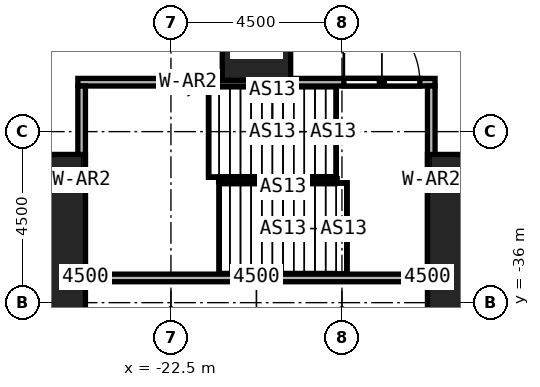
"""IFC4 building model, lengths in metres.
Left out: names, types, materials, properties, quantities, classifications, styles, units other than length and angle.
Written with IfcOpenShell. Run it as: python <this file> out.ifc"""

import sys

from ifc_helpers import new_model, si_unit, direction, frame, frame_2d, origin, origin_2d, place, context, subcontext, project, spatial, rectangle, extrude, element, fill, save


model = new_model("IFC4")
c1 = context("Model", 3, precision=1e-05, world=origin(), true_north=direction((0.0, 1.0)))
c2 = subcontext(c1, "Body", "Model", "MODEL_VIEW")
j1 = project(units=[si_unit("LENGTHUNIT", "METRE"), si_unit("PLANEANGLEUNIT", "RADIAN")], contexts=[c1])
p1 = place(None, origin())
s1 = spatial("IfcSite", under=j1, at=p1, CompositionType="ELEMENT")
p2 = place(p1, origin())
s2 = spatial("IfcBuilding", under=s1, at=p2, CompositionType="ELEMENT")
p3 = place(p2, origin())
s3 = spatial("IfcBuildingStorey", under=s2, at=p3, CompositionType="ELEMENT", Elevation=0.0)
for number, where, z_axis, x_axis in (
    (1, (-27.0, -35.55, 0.0), (0.0, 0.0, 1.0), (1.0, 0.0, 0.0)),
    (2, (-13.5, -35.55, 0.0), (0.0, 0.0, 1.0), (1.0, 0.0, 0.0)),
):
    element("IfcColumn", number, at=place(p3, frame(where, z_axis=z_axis, x_axis=x_axis)), inside=s3, PredefinedType="COLUMN", context=c2, shape_type="SweptSolid", body=[
        extrude(rectangle(XDim=4.5, YDim=6.9, at=origin_2d()), origin(), (0.0, 0.0, 1.0), 12.0),
    ])
p4 = place(p3, frame((-20.25, -29.25, 0.0), z_axis=(0.0, 0.0, 1.0), x_axis=(1.0, 0.0, 0.0)))
e3 = element("IfcColumn", 3, at=p4, inside=s3, PredefinedType="COLUMN", context=c2, shape_type="SweptSolid", body=[
    extrude(rectangle(XDim=1.8, YDim=1.8, at=origin_2d()), origin(), (0.0, 0.0, 1.0), 12.0),
])
p5 = place(p3, frame((-24.95, -30.2, 0.0), z_axis=(0.0, 0.0, 1.0), x_axis=(1.0, 0.0, 0.0)))
e4 = element("IfcWall", 4, at=p5, inside=s3, PredefinedType="SOLIDWALL", context=c2, shape_type="SweptSolid", body=[
    extrude(rectangle(XDim=9.4, YDim=0.2, at=frame_2d((4.7, 0.0))), origin(), (0.0, 0.0, 1.0), 12.0),
])
p6 = place(p5, frame((7.0, 0.0, 0.0)))
e5 = element("IfcOpeningElement", 5, at=p6, cuts=e4, PredefinedType="OPENING", context=c2, shape_type="SweptSolid", body=[
    extrude(rectangle(XDim=2.0, YDim=2.4, at=frame_2d((1.0, 1.2))), frame((0.0, 0.1, 0.0), z_axis=(0.0, -1.0, 0.0), x_axis=(1.0, 0.0, 0.0)), (0.0, 0.0, 1.0), 0.2),
])
p7 = place(p3, frame((-24.95, -35.35, 0.0), z_axis=(0.0, 0.0, 1.0), x_axis=(1.0, 0.0, 0.0)))
e6 = element("IfcWall", 6, at=p7, inside=s3, PredefinedType="SOLIDWALL", context=c2, shape_type="SweptSolid", body=[
    extrude(rectangle(XDim=9.4, YDim=0.2, at=frame_2d((4.7, 0.0))), origin(), (0.0, 0.0, 1.0), 12.0),
])
for number, where, z_axis, x_axis in (
    (7, (-24.85, -35.25, 0.0), (0.0, 0.0, 1.0), (0.0, 1.0, 0.0)),
    (8, (-15.65, -35.25, 0.0), (0.0, 0.0, 1.0), (0.0, 1.0, 0.0)),
):
    element("IfcWall", number, at=place(p3, frame(where, z_axis=z_axis, x_axis=x_axis)), inside=s3, PredefinedType="SOLIDWALL", context=c2, shape_type="SweptSolid", body=[
        extrude(rectangle(XDim=4.95, YDim=0.2, at=frame_2d((2.475, 0.0))), origin(), (0.0, 0.0, 1.0), 12.0),
    ])
p8 = place(p6, origin())
e9 = element("IfcDoor", 9, at=p8, inside=s3, OperationType="DOUBLE_DOOR_SINGLE_SWING", PredefinedType="DOOR", context=c2, shape_type="SweptSolid", body=[
    extrude(rectangle(XDim=2.0, YDim=2.4, at=frame_2d((1.0, 1.2))), frame((0.0, 0.025, 0.0), z_axis=(0.0, -1.0, 0.0), x_axis=(1.0, 0.0, 0.0)), (0.0, 0.0, 1.0), 0.05),
])
fill(e5, e9)
save(model, sys.argv[1])
